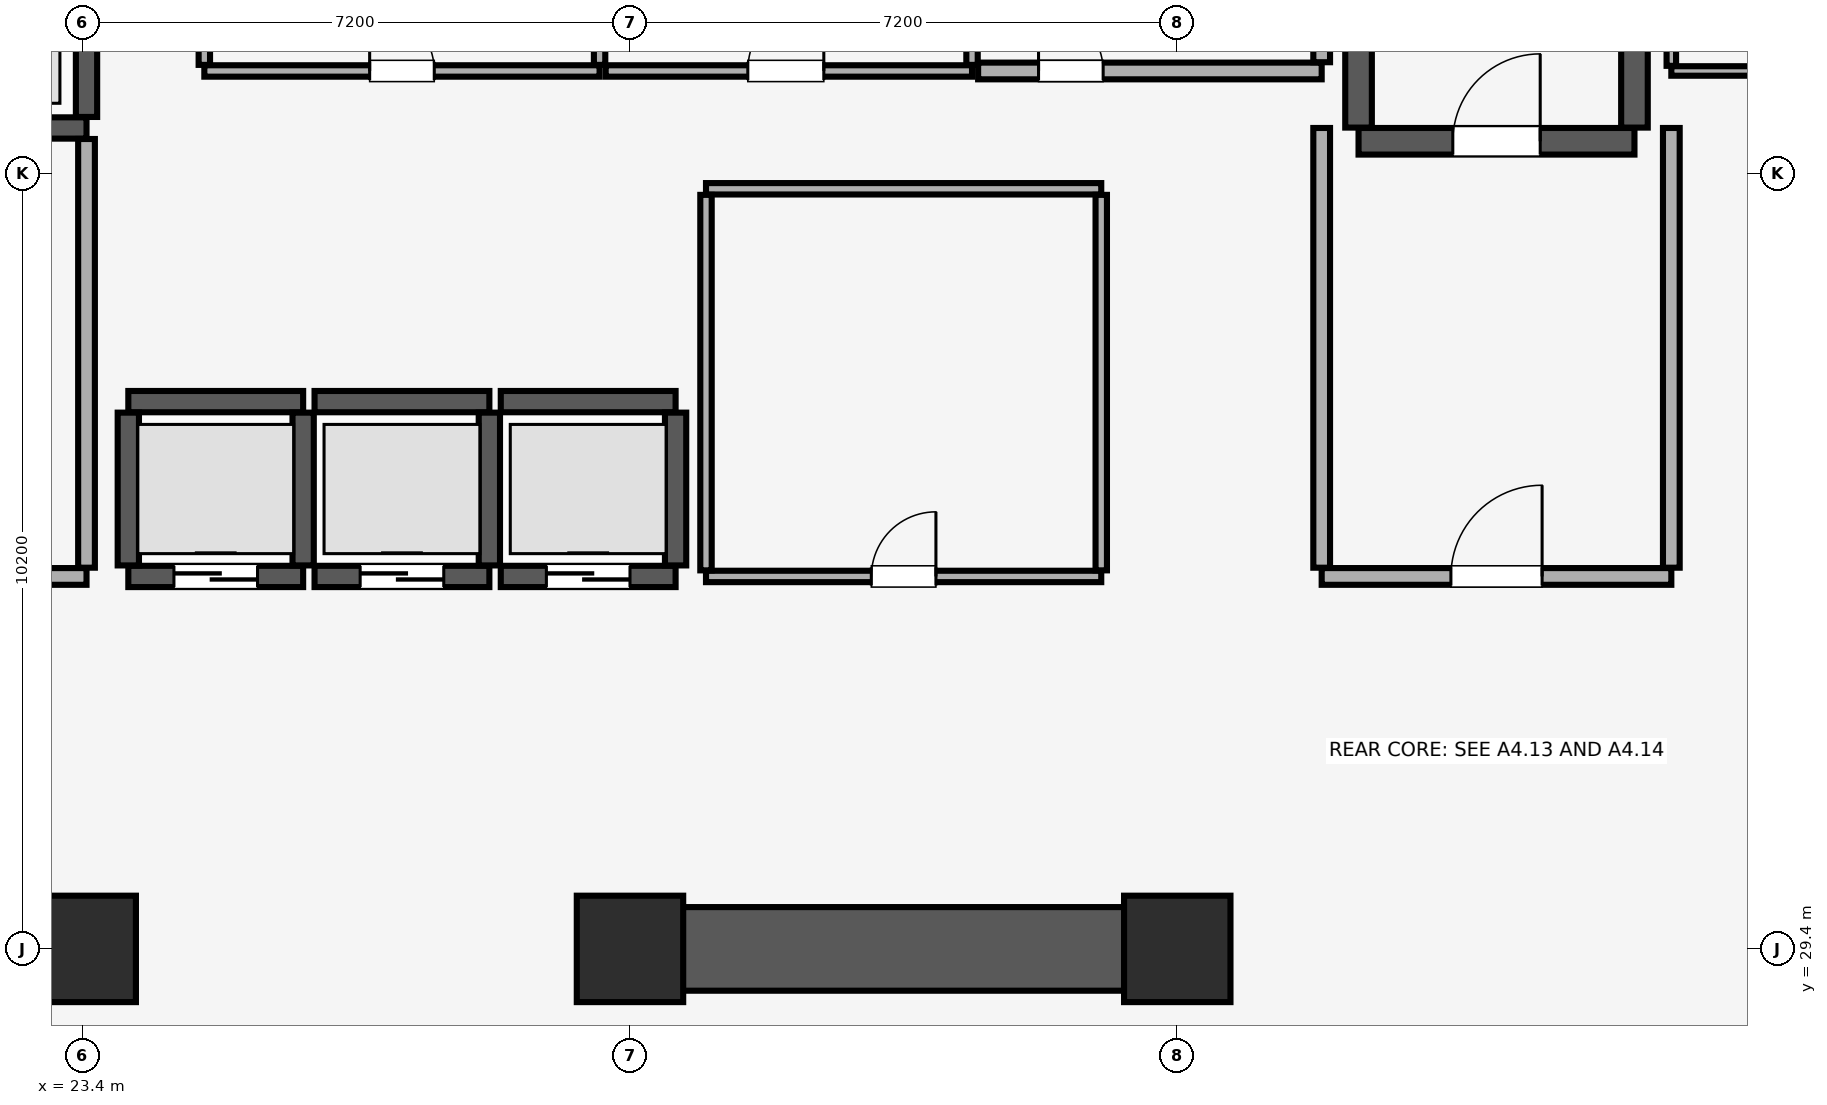
"""IFC4 building model, lengths in metres.
Left out: names, types, materials, properties, quantities, classifications, styles, units other than length and angle.
Written with IfcOpenShell. Run it as: python <this file> out.ifc"""

import sys

from ifc_helpers import new_model, si_unit, direction, frame, frame_2d, origin, origin_2d, place, context, subcontext, project, spatial, rectangle, extrude, element, fill, save


model = new_model("IFC4")
c1 = context("Model", 3, precision=1e-05, world=origin(), true_north=direction((0.0, 1.0)))
c2 = subcontext(c1, "Body", "Model", "MODEL_VIEW")
j1 = project(units=[si_unit("LENGTHUNIT", "METRE"), si_unit("PLANEANGLEUNIT", "RADIAN")], contexts=[c1])
p1 = place(None, origin())
s1 = spatial("IfcSite", under=j1, at=p1, CompositionType="ELEMENT")
p2 = place(p1, origin())
s2 = spatial("IfcBuilding", under=s1, at=p2, CompositionType="ELEMENT")
p3 = place(p2, frame((0.0, 0.0, 80.15)))
s3 = spatial("IfcBuildingStorey", under=s2, at=p3, CompositionType="ELEMENT", Elevation=80.15)
for number, where, z_axis, x_axis in (
    (1, (23.4, 29.4, 0.0), (0.0, 0.0, 1.0), (1.0, 0.0, 0.0)),
    (2, (30.6, 29.4, 0.0), (0.0, 0.0, 1.0), (1.0, 0.0, 0.0)),
    (3, (37.8, 29.4, 0.0), (0.0, 0.0, 1.0), (1.0, 0.0, 0.0)),
):
    element("IfcColumn", number, at=place(p3, frame(where, z_axis=z_axis, x_axis=x_axis)), inside=s3, PredefinedType="COLUMN", context=c2, shape_type="SweptSolid", body=[
        extrude(rectangle(XDim=1.4, YDim=1.4, at=origin_2d()), origin(), (0.0, 0.0, 1.0), 5.16),
    ])
p4 = place(p3, frame((16.755, 29.4, 0.0), z_axis=(0.0, 0.0, 1.0), x_axis=(1.0, 0.0, 0.0)))
e4 = element("IfcWall", 4, at=p4, inside=s3, PredefinedType="SHEAR", context=c2, shape_type="SweptSolid", body=[
    extrude(rectangle(XDim=6.845, YDim=1.1, at=frame_2d((3.423, 0.0))), origin(), (0.0, 0.0, 1.0), 5.16),
])
p5 = place(p3, frame((30.4, 29.4, 0.0), z_axis=(0.0, 0.0, 1.0), x_axis=(1.0, 0.0, 0.0)))
e5 = element("IfcWall", 5, at=p5, inside=s3, PredefinedType="SHEAR", context=c2, shape_type="SweptSolid", body=[
    extrude(rectangle(XDim=7.6, YDim=1.1, at=frame_2d((3.8, 0.0))), origin(), (0.0, 0.0, 1.0), 5.16),
])
p6 = place(p3, frame((40.185, 40.025, 0.0), z_axis=(0.0, 0.0, 1.0), x_axis=(1.0, 0.0, 0.0)))
e6 = element("IfcWall", 6, at=p6, inside=s3, PredefinedType="SHEAR", context=c2, shape_type="SweptSolid", body=[
    extrude(rectangle(XDim=3.63, YDim=0.35, at=frame_2d((1.815, 0.0))), origin(), (0.0, 0.0, 1.0), 5.16),
])
p7 = place(p6, frame((1.24, 0.0, 0.0)))
e7 = element("IfcOpeningElement", 7, at=p7, cuts=e6, PredefinedType="OPENING", context=c2, shape_type="SweptSolid", body=[
    extrude(rectangle(XDim=1.15, YDim=2.15, at=frame_2d((0.575, 1.075))), frame((0.0, 0.185, 0.0), z_axis=(0.0, -1.0, 0.0), x_axis=(1.0, 0.0, 0.0)), (0.0, 0.0, 1.0), 0.37),
])
for number, where, z_axis, x_axis in (
    (8, (40.185, 40.205, 0.0), (0.0, 0.0, 1.0), (0.0, 1.0, 0.0)),
    (9, (43.815, 40.205, 0.0), (0.0, 0.0, 1.0), (0.0, 1.0, 0.0)),
):
    element("IfcWall", number, at=place(p3, frame(where, z_axis=z_axis, x_axis=x_axis)), inside=s3, PredefinedType="SHEAR", context=c2, shape_type="SweptSolid", body=[
        extrude(rectangle(XDim=8.09, YDim=0.35, at=frame_2d((4.045, 0.0))), origin(), (0.0, 0.0, 1.0), 5.16),
    ])
p8 = place(p3, frame((24.0, 34.3, 0.0), z_axis=(0.0, 0.0, 1.0), x_axis=(1.0, 0.0, 0.0)))
e10 = element("IfcWall", 10, at=p8, inside=s3, PredefinedType="SHEAR", context=c2, shape_type="SweptSolid", body=[
    extrude(rectangle(XDim=2.3, YDim=0.28, at=frame_2d((1.15, 0.0))), origin(), (0.0, 0.0, 1.0), 5.16),
])
p9 = place(p8, frame((0.6, 0.0, 0.0)))
e11 = element("IfcOpeningElement", 11, at=p9, cuts=e10, PredefinedType="OPENING", context=c2, shape_type="SweptSolid", body=[
    extrude(rectangle(XDim=1.1, YDim=2.2, at=frame_2d((0.55, 1.1))), frame((0.0, 0.15, 0.0), z_axis=(0.0, -1.0, 0.0), x_axis=(1.0, 0.0, 0.0)), (0.0, 0.0, 1.0), 0.3),
])
p10 = place(p3, frame((24.0, 36.6, 0.0), z_axis=(0.0, 0.0, 1.0), x_axis=(1.0, 0.0, 0.0)))
e12 = element("IfcWall", 12, at=p10, inside=s3, PredefinedType="SHEAR", context=c2, shape_type="SweptSolid", body=[
    extrude(rectangle(XDim=2.3, YDim=0.28, at=frame_2d((1.15, 0.0))), origin(), (0.0, 0.0, 1.0), 5.16),
])
for number, where, z_axis, x_axis in (
    (13, (24.0, 34.445, 0.0), (0.0, 0.0, 1.0), (0.0, 1.0, 0.0)),
    (14, (26.3, 34.445, 0.0), (0.0, 0.0, 1.0), (0.0, 1.0, 0.0)),
):
    element("IfcWall", number, at=place(p3, frame(where, z_axis=z_axis, x_axis=x_axis)), inside=s3, PredefinedType="SHEAR", context=c2, shape_type="SweptSolid", body=[
        extrude(rectangle(XDim=2.01, YDim=0.28, at=frame_2d((1.005, 0.0))), origin(), (0.0, 0.0, 1.0), 5.16),
    ])
p11 = place(p3, frame((26.45, 34.3, 0.0), z_axis=(0.0, 0.0, 1.0), x_axis=(1.0, 0.0, 0.0)))
e15 = element("IfcWall", 15, at=p11, inside=s3, PredefinedType="SHEAR", context=c2, shape_type="SweptSolid", body=[
    extrude(rectangle(XDim=2.3, YDim=0.28, at=frame_2d((1.15, 0.0))), origin(), (0.0, 0.0, 1.0), 5.16),
])
p12 = place(p11, frame((0.6, 0.0, 0.0)))
e16 = element("IfcOpeningElement", 16, at=p12, cuts=e15, PredefinedType="OPENING", context=c2, shape_type="SweptSolid", body=[
    extrude(rectangle(XDim=1.1, YDim=2.2, at=frame_2d((0.55, 1.1))), frame((0.0, 0.15, 0.0), z_axis=(0.0, -1.0, 0.0), x_axis=(1.0, 0.0, 0.0)), (0.0, 0.0, 1.0), 0.3),
])
p13 = place(p3, frame((26.45, 36.6, 0.0), z_axis=(0.0, 0.0, 1.0), x_axis=(1.0, 0.0, 0.0)))
e17 = element("IfcWall", 17, at=p13, inside=s3, PredefinedType="SHEAR", context=c2, shape_type="SweptSolid", body=[
    extrude(rectangle(XDim=2.3, YDim=0.28, at=frame_2d((1.15, 0.0))), origin(), (0.0, 0.0, 1.0), 5.16),
])
p14 = place(p3, frame((28.75, 34.445, 0.0), z_axis=(0.0, 0.0, 1.0), x_axis=(0.0, 1.0, 0.0)))
e18 = element("IfcWall", 18, at=p14, inside=s3, PredefinedType="SHEAR", context=c2, shape_type="SweptSolid", body=[
    extrude(rectangle(XDim=2.01, YDim=0.28, at=frame_2d((1.005, 0.0))), origin(), (0.0, 0.0, 1.0), 5.16),
])
p15 = place(p3, frame((28.9, 34.3, 0.0), z_axis=(0.0, 0.0, 1.0), x_axis=(1.0, 0.0, 0.0)))
e19 = element("IfcWall", 19, at=p15, inside=s3, PredefinedType="SHEAR", context=c2, shape_type="SweptSolid", body=[
    extrude(rectangle(XDim=2.3, YDim=0.28, at=frame_2d((1.15, 0.0))), origin(), (0.0, 0.0, 1.0), 5.16),
])
p16 = place(p15, frame((0.6, 0.0, 0.0)))
e20 = element("IfcOpeningElement", 20, at=p16, cuts=e19, PredefinedType="OPENING", context=c2, shape_type="SweptSolid", body=[
    extrude(rectangle(XDim=1.1, YDim=2.2, at=frame_2d((0.55, 1.1))), frame((0.0, 0.15, 0.0), z_axis=(0.0, -1.0, 0.0), x_axis=(1.0, 0.0, 0.0)), (0.0, 0.0, 1.0), 0.3),
])
p17 = place(p3, frame((28.9, 36.6, 0.0), z_axis=(0.0, 0.0, 1.0), x_axis=(1.0, 0.0, 0.0)))
e21 = element("IfcWall", 21, at=p17, inside=s3, PredefinedType="SHEAR", context=c2, shape_type="SweptSolid", body=[
    extrude(rectangle(XDim=2.3, YDim=0.28, at=frame_2d((1.15, 0.0))), origin(), (0.0, 0.0, 1.0), 5.16),
])
p18 = place(p3, frame((31.2, 34.445, 0.0), z_axis=(0.0, 0.0, 1.0), x_axis=(0.0, 1.0, 0.0)))
e22 = element("IfcWall", 22, at=p18, inside=s3, PredefinedType="SHEAR", context=c2, shape_type="SweptSolid", body=[
    extrude(rectangle(XDim=2.01, YDim=0.28, at=frame_2d((1.005, 0.0))), origin(), (0.0, 0.0, 1.0), 5.16),
])
p19 = place(p3, frame((21.035, 40.2, 0.0), z_axis=(0.0, 0.0, 1.0), x_axis=(1.0, 0.0, 0.0)))
e23 = element("IfcWall", 23, at=p19, inside=s3, PredefinedType="SHEAR", context=c2, shape_type="SweptSolid", body=[
    extrude(rectangle(XDim=2.415, YDim=0.28, at=frame_2d((1.208, 0.0))), origin(), (0.0, 0.0, 1.0), 5.16),
])
p20 = place(p19, frame((0.54, 0.0, 0.0)))
e24 = element("IfcOpeningElement", 24, at=p20, cuts=e23, PredefinedType="OPENING", context=c2, shape_type="SweptSolid", body=[
    extrude(rectangle(XDim=1.3, YDim=2.3, at=frame_2d((0.65, 1.15))), frame((0.0, 0.15, 0.0), z_axis=(0.0, -1.0, 0.0), x_axis=(1.0, 0.0, 0.0)), (0.0, 0.0, 1.0), 0.3),
])
p21 = place(p3, frame((23.45, 40.345, 0.0), z_axis=(0.0, 0.0, 1.0), x_axis=(0.0, 1.0, 0.0)))
e25 = element("IfcWall", 25, at=p21, inside=s3, PredefinedType="SHEAR", context=c2, shape_type="SweptSolid", body=[
    extrude(rectangle(XDim=2.81, YDim=0.28, at=frame_2d((1.405, 0.0))), origin(), (0.0, 0.0, 1.0), 5.16),
])
p22 = place(p3, frame((17.4, 34.3, 0.0), z_axis=(0.0, 0.0, 1.0), x_axis=(1.0, 0.0, 0.0)))
e26 = element("IfcWall", 26, at=p22, inside=s3, PredefinedType="PARTITIONING", context=c2, shape_type="SweptSolid", body=[
    extrude(rectangle(XDim=6.05, YDim=0.22, at=frame_2d((3.025, 0.0))), origin(), (0.0, 0.0, 1.0), 5.16),
])
p23 = place(p22, frame((2.2, 0.0, 0.0)))
e27 = element("IfcOpeningElement", 27, at=p23, cuts=e26, PredefinedType="OPENING", context=c2, shape_type="SweptSolid", body=[
    extrude(rectangle(XDim=1.2, YDim=2.15, at=frame_2d((0.6, 1.075))), frame((0.0, 0.12, 0.0), z_axis=(0.0, -1.0, 0.0), x_axis=(1.0, 0.0, 0.0)), (0.0, 0.0, 1.0), 0.24),
])
p24 = place(p3, frame((23.45, 34.415, 0.0), z_axis=(0.0, 0.0, 1.0), x_axis=(0.0, 1.0, 0.0)))
e28 = element("IfcWall", 28, at=p24, inside=s3, PredefinedType="PARTITIONING", context=c2, shape_type="SweptSolid", body=[
    extrude(rectangle(XDim=5.64, YDim=0.22, at=frame_2d((2.82, 0.0))), origin(), (0.0, 0.0, 1.0), 5.16),
])
p25 = place(p3, frame((39.7, 34.3, 0.0), z_axis=(0.0, 0.0, 1.0), x_axis=(1.0, 0.0, 0.0)))
e29 = element("IfcWall", 29, at=p25, inside=s3, PredefinedType="PARTITIONING", context=c2, shape_type="SweptSolid", body=[
    extrude(rectangle(XDim=4.6, YDim=0.22, at=frame_2d((2.3, 0.0))), origin(), (0.0, 0.0, 1.0), 5.16),
])
p26 = place(p25, frame((1.7, 0.0, 0.0)))
e30 = element("IfcOpeningElement", 30, at=p26, cuts=e29, PredefinedType="OPENING", context=c2, shape_type="SweptSolid", body=[
    extrude(rectangle(XDim=1.2, YDim=2.15, at=frame_2d((0.6, 1.075))), frame((0.0, 0.12, 0.0), z_axis=(0.0, -1.0, 0.0), x_axis=(1.0, 0.0, 0.0)), (0.0, 0.0, 1.0), 0.24),
])
for number, where, z_axis, x_axis in (
    (31, (39.7, 34.415, 0.0), (0.0, 0.0, 1.0), (0.0, 1.0, 0.0)),
    (32, (44.3, 34.415, 0.0), (0.0, 0.0, 1.0), (0.0, 1.0, 0.0)),
):
    element("IfcWall", number, at=place(p3, frame(where, z_axis=z_axis, x_axis=x_axis)), inside=s3, PredefinedType="PARTITIONING", context=c2, shape_type="SweptSolid", body=[
        extrude(rectangle(XDim=5.785, YDim=0.22, at=frame_2d((2.893, 0.0))), origin(), (0.0, 0.0, 1.0), 5.16),
    ])
p27 = place(p3, frame((31.6, 34.3, 0.0), z_axis=(0.0, 0.0, 1.0), x_axis=(1.0, 0.0, 0.0)))
e33 = element("IfcWall", 33, at=p27, inside=s3, PredefinedType="PARTITIONING", context=c2, shape_type="SweptSolid", body=[
    extrude(rectangle(XDim=5.2, YDim=0.15, at=frame_2d((2.6, 0.0))), origin(), (0.0, 0.0, 1.0), 5.16),
])
p28 = place(p27, frame((2.175, 0.0, 0.0)))
e34 = element("IfcOpeningElement", 34, at=p28, cuts=e33, PredefinedType="OPENING", context=c2, shape_type="SweptSolid", body=[
    extrude(rectangle(XDim=0.85, YDim=2.1, at=frame_2d((0.425, 1.05))), frame((0.0, 0.085, 0.0), z_axis=(0.0, -1.0, 0.0), x_axis=(1.0, 0.0, 0.0)), (0.0, 0.0, 1.0), 0.17),
])
p29 = place(p3, frame((31.6, 39.4, 0.0), z_axis=(0.0, 0.0, 1.0), x_axis=(1.0, 0.0, 0.0)))
e35 = element("IfcWall", 35, at=p29, inside=s3, PredefinedType="PARTITIONING", context=c2, shape_type="SweptSolid", body=[
    extrude(rectangle(XDim=5.2, YDim=0.15, at=frame_2d((2.6, 0.0))), origin(), (0.0, 0.0, 1.0), 5.16),
])
for number, where, z_axis, x_axis in (
    (36, (31.6, 34.38, 0.0), (0.0, 0.0, 1.0), (0.0, 1.0, 0.0)),
    (37, (36.8, 34.38, 0.0), (0.0, 0.0, 1.0), (0.0, 1.0, 0.0)),
):
    element("IfcWall", number, at=place(p3, frame(where, z_axis=z_axis, x_axis=x_axis)), inside=s3, PredefinedType="PARTITIONING", context=c2, shape_type="SweptSolid", body=[
        extrude(rectangle(XDim=4.94, YDim=0.15, at=frame_2d((2.47, 0.0))), origin(), (0.0, 0.0, 1.0), 5.16),
    ])
p30 = place(p3, frame((25.0, 40.95, 0.0), z_axis=(0.0, 0.0, 1.0), x_axis=(1.0, 0.0, 0.0)))
e38 = element("IfcWall", 38, at=p30, inside=s3, PredefinedType="PARTITIONING", context=c2, shape_type="SweptSolid", body=[
    extrude(rectangle(XDim=5.2, YDim=0.15, at=frame_2d((2.6, 0.0))), origin(), (0.0, 0.0, 1.0), 5.16),
])
p31 = place(p30, frame((2.175, 0.0, 0.0)))
e39 = element("IfcOpeningElement", 39, at=p31, cuts=e38, PredefinedType="OPENING", context=c2, shape_type="SweptSolid", body=[
    extrude(rectangle(XDim=0.85, YDim=2.1, at=frame_2d((0.425, 1.05))), frame((0.0, 0.085, 0.0), z_axis=(0.0, -1.0, 0.0), x_axis=(1.0, 0.0, 0.0)), (0.0, 0.0, 1.0), 0.17),
])
for number, where, z_axis, x_axis in (
    (40, (25.0, 41.03, 0.0), (0.0, 0.0, 1.0), (0.0, 1.0, 0.0)),
    (41, (30.2, 41.03, 0.0), (0.0, 0.0, 1.0), (0.0, 1.0, 0.0)),
):
    element("IfcWall", number, at=place(p3, frame(where, z_axis=z_axis, x_axis=x_axis)), inside=s3, PredefinedType="PARTITIONING", context=c2, shape_type="SweptSolid", body=[
        extrude(rectangle(XDim=7.82, YDim=0.15, at=frame_2d((3.91, 0.0))), origin(), (0.0, 0.0, 1.0), 5.16),
    ])
p32 = place(p3, frame((30.28, 40.95, 0.0), z_axis=(0.0, 0.0, 1.0), x_axis=(1.0, 0.0, 0.0)))
e42 = element("IfcWall", 42, at=p32, inside=s3, PredefinedType="PARTITIONING", context=c2, shape_type="SweptSolid", body=[
    extrude(rectangle(XDim=4.82, YDim=0.15, at=frame_2d((2.41, 0.0))), origin(), (0.0, 0.0, 1.0), 5.16),
])
p33 = place(p32, frame((1.87, 0.0, 0.0)))
e43 = element("IfcOpeningElement", 43, at=p33, cuts=e42, PredefinedType="OPENING", context=c2, shape_type="SweptSolid", body=[
    extrude(rectangle(XDim=1.0, YDim=2.15, at=frame_2d((0.5, 1.075))), frame((0.0, 0.085, 0.0), z_axis=(0.0, -1.0, 0.0), x_axis=(1.0, 0.0, 0.0)), (0.0, 0.0, 1.0), 0.17),
])
p34 = place(p3, frame((35.1, 41.03, 0.0), z_axis=(0.0, 0.0, 1.0), x_axis=(0.0, 1.0, 0.0)))
e44 = element("IfcWall", 44, at=p34, inside=s3, PredefinedType="PARTITIONING", context=c2, shape_type="SweptSolid", body=[
    extrude(rectangle(XDim=7.82, YDim=0.15, at=frame_2d((3.91, 0.0))), origin(), (0.0, 0.0, 1.0), 5.16),
])
p35 = place(p3, frame((35.18, 40.95, 0.0), z_axis=(0.0, 0.0, 1.0), x_axis=(1.0, 0.0, 0.0)))
e45 = element("IfcWall", 45, at=p35, inside=s3, PredefinedType="PARTITIONING", context=c2, shape_type="SweptSolid", body=[
    extrude(rectangle(XDim=4.52, YDim=0.22, at=frame_2d((2.26, 0.0))), origin(), (0.0, 0.0, 1.0), 5.16),
])
p36 = place(p35, frame((0.795, 0.0, 0.0)))
e46 = element("IfcOpeningElement", 46, at=p36, cuts=e45, PredefinedType="OPENING", context=c2, shape_type="SweptSolid", body=[
    extrude(rectangle(XDim=0.85, YDim=2.1, at=frame_2d((0.425, 1.05))), frame((0.0, 0.12, 0.0), z_axis=(0.0, -1.0, 0.0), x_axis=(1.0, 0.0, 0.0)), (0.0, 0.0, 1.0), 0.24),
])
p37 = place(p3, frame((39.7, 41.065, 0.0), z_axis=(0.0, 0.0, 1.0), x_axis=(0.0, 1.0, 0.0)))
e47 = element("IfcWall", 47, at=p37, inside=s3, PredefinedType="PARTITIONING", context=c2, shape_type="SweptSolid", body=[
    extrude(rectangle(XDim=7.785, YDim=0.22, at=frame_2d((3.893, 0.0))), origin(), (0.0, 0.0, 1.0), 5.16),
])
p38 = place(p3, frame((44.3, 40.95, 0.0), z_axis=(0.0, 0.0, 1.0), x_axis=(1.0, 0.0, 0.0)))
e48 = element("IfcWall", 48, at=p38, inside=s3, PredefinedType="PARTITIONING", context=c2, shape_type="SweptSolid", body=[
    extrude(rectangle(XDim=3.1, YDim=0.125, at=frame_2d((1.55, 0.0))), origin(), (0.0, 0.0, 1.0), 5.16),
])
p39 = place(p38, frame((1.1, 0.0, 0.0)))
e49 = element("IfcOpeningElement", 49, at=p39, cuts=e48, PredefinedType="OPENING", context=c2, shape_type="SweptSolid", body=[
    extrude(rectangle(XDim=0.9, YDim=2.1, at=frame_2d((0.45, 1.05))), frame((0.0, 0.073, 0.0), z_axis=(0.0, -1.0, 0.0), x_axis=(1.0, 0.0, 0.0)), (0.0, 0.0, 1.0), 0.145),
])
p40 = place(p3, frame((44.3, 41.018, 0.0), z_axis=(0.0, 0.0, 1.0), x_axis=(0.0, 1.0, 0.0)))
e50 = element("IfcWall", 50, at=p40, inside=s3, PredefinedType="PARTITIONING", context=c2, shape_type="SweptSolid", body=[
    extrude(rectangle(XDim=7.833, YDim=0.125, at=frame_2d((3.916, 0.0))), origin(), (0.0, 0.0, 1.0), 5.16),
])
p41 = place(p7, origin())
e51 = element("IfcDoor", 51, at=p41, inside=s3, OperationType="SINGLE_SWING_RIGHT", PredefinedType="DOOR", context=c2, shape_type="SweptSolid", body=[
    extrude(rectangle(XDim=1.15, YDim=2.15, at=frame_2d((0.575, 1.075))), frame((0.0, 0.025, 0.0), z_axis=(0.0, -1.0, 0.0), x_axis=(1.0, 0.0, 0.0)), (0.0, 0.0, 1.0), 0.05),
])
fill(e7, e51)
p42 = place(p9, origin())
e52 = element("IfcDoor", 52, at=p42, inside=s3, OperationType="DOUBLE_DOOR_SLIDING", PredefinedType="DOOR", context=c2, shape_type="SweptSolid", body=[
    extrude(rectangle(XDim=1.1, YDim=2.2, at=frame_2d((0.55, 1.1))), frame((0.0, 0.025, 0.0), z_axis=(0.0, -1.0, 0.0), x_axis=(1.0, 0.0, 0.0)), (0.0, 0.0, 1.0), 0.05),
])
fill(e11, e52)
p43 = place(p12, origin())
e53 = element("IfcDoor", 53, at=p43, inside=s3, OperationType="DOUBLE_DOOR_SLIDING", PredefinedType="DOOR", context=c2, shape_type="SweptSolid", body=[
    extrude(rectangle(XDim=1.1, YDim=2.2, at=frame_2d((0.55, 1.1))), frame((0.0, 0.025, 0.0), z_axis=(0.0, -1.0, 0.0), x_axis=(1.0, 0.0, 0.0)), (0.0, 0.0, 1.0), 0.05),
])
fill(e16, e53)
p44 = place(p16, origin())
e54 = element("IfcDoor", 54, at=p44, inside=s3, OperationType="DOUBLE_DOOR_SLIDING", PredefinedType="DOOR", context=c2, shape_type="SweptSolid", body=[
    extrude(rectangle(XDim=1.1, YDim=2.2, at=frame_2d((0.55, 1.1))), frame((0.0, 0.025, 0.0), z_axis=(0.0, -1.0, 0.0), x_axis=(1.0, 0.0, 0.0)), (0.0, 0.0, 1.0), 0.05),
])
fill(e20, e54)
p45 = place(p26, origin())
e55 = element("IfcDoor", 55, at=p45, inside=s3, OperationType="SINGLE_SWING_RIGHT", PredefinedType="DOOR", context=c2, shape_type="SweptSolid", body=[
    extrude(rectangle(XDim=1.2, YDim=2.15, at=frame_2d((0.6, 1.075))), frame((0.0, 0.025, 0.0), z_axis=(0.0, -1.0, 0.0), x_axis=(1.0, 0.0, 0.0)), (0.0, 0.0, 1.0), 0.05),
])
fill(e30, e55)
p46 = place(p28, origin())
e56 = element("IfcDoor", 56, at=p46, inside=s3, OperationType="SINGLE_SWING_RIGHT", PredefinedType="DOOR", context=c2, shape_type="SweptSolid", body=[
    extrude(rectangle(XDim=0.85, YDim=2.1, at=frame_2d((0.425, 1.05))), frame((0.0, 0.025, 0.0), z_axis=(0.0, -1.0, 0.0), x_axis=(1.0, 0.0, 0.0)), (0.0, 0.0, 1.0), 0.05),
])
fill(e34, e56)
p47 = place(p31, origin())
e57 = element("IfcDoor", 57, at=p47, inside=s3, OperationType="SINGLE_SWING_LEFT", PredefinedType="DOOR", context=c2, shape_type="SweptSolid", body=[
    extrude(rectangle(XDim=0.85, YDim=2.1, at=frame_2d((0.425, 1.05))), frame((0.0, 0.025, 0.0), z_axis=(0.0, -1.0, 0.0), x_axis=(1.0, 0.0, 0.0)), (0.0, 0.0, 1.0), 0.05),
])
fill(e39, e57)
p48 = place(p33, origin())
e58 = element("IfcDoor", 58, at=p48, inside=s3, OperationType="SINGLE_SWING_RIGHT", PredefinedType="DOOR", context=c2, shape_type="SweptSolid", body=[
    extrude(rectangle(XDim=1.0, YDim=2.15, at=frame_2d((0.5, 1.075))), frame((0.0, 0.025, 0.0), z_axis=(0.0, -1.0, 0.0), x_axis=(1.0, 0.0, 0.0)), (0.0, 0.0, 1.0), 0.05),
])
fill(e43, e58)
p49 = place(p36, origin())
e59 = element("IfcDoor", 59, at=p49, inside=s3, OperationType="SINGLE_SWING_LEFT", PredefinedType="DOOR", context=c2, shape_type="SweptSolid", body=[
    extrude(rectangle(XDim=0.85, YDim=2.1, at=frame_2d((0.425, 1.05))), frame((0.0, 0.025, 0.0), z_axis=(0.0, -1.0, 0.0), x_axis=(1.0, 0.0, 0.0)), (0.0, 0.0, 1.0), 0.05),
])
fill(e46, e59)
save(model, sys.argv[1])
